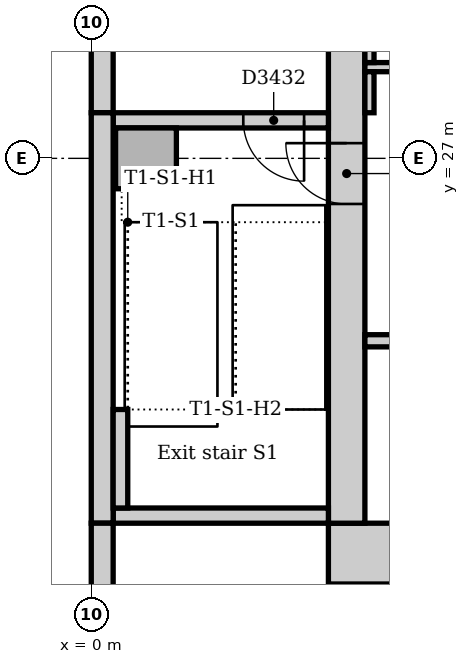
"""IFC4 building model, lengths in metres.
Left out: names, types, materials, properties, quantities, classifications, styles, units other than length and angle.
Written with IfcOpenShell. Run it as: python <this file> out.ifc"""

import sys

from ifc_helpers import new_model, si_unit, direction, frame, frame_2d, origin, origin_2d, place, context, subcontext, project, spatial, rectangle, extrude, element, fill, save


model = new_model("IFC4")
c1 = context("Model", 3, precision=1e-05, world=origin(), true_north=direction((0.0, 1.0)))
c2 = subcontext(c1, "Body", "Model", "MODEL_VIEW")
j1 = project(units=[si_unit("LENGTHUNIT", "METRE"), si_unit("PLANEANGLEUNIT", "RADIAN")], contexts=[c1])
p1 = place(None, origin())
s1 = spatial("IfcSite", under=j1, at=p1, CompositionType="ELEMENT")
p2 = place(p1, origin())
s2 = spatial("IfcBuilding", under=s1, at=p2, CompositionType="ELEMENT")
p3 = place(p2, frame((0.0, 0.0, 51.0)))
s3 = spatial("IfcBuildingStorey", under=s2, at=p3, CompositionType="ELEMENT", Elevation=51.0)
p4 = place(p3, frame((3.9, 20.5, 0.0), z_axis=(0.0, 0.0, 1.0), x_axis=(1.0, 0.0, 0.0)))
e1 = element("IfcWall", 1, at=p4, inside=s3, PredefinedType="SOLIDWALL", context=c2, shape_type="SweptSolid", body=[
    extrude(rectangle(XDim=19.6, YDim=1.0, at=frame_2d((9.8, 0.0))), origin(), (0.0, 0.0, 1.0), 4.0),
])
p5 = place(p3, frame((4.2, 31.5, 0.0), z_axis=(0.0, 0.0, 1.0), x_axis=(0.0, -1.0, 0.0)))
e2 = element("IfcWall", 2, at=p5, inside=s3, PredefinedType="SOLIDWALL", context=c2, shape_type="SweptSolid", body=[
    extrude(rectangle(XDim=10.5, YDim=0.6, at=frame_2d((5.25, 0.0))), origin(), (0.0, 0.0, 1.0), 4.0),
])
p6 = place(p5, frame((4.25, 0.0, 0.0)))
e3 = element("IfcOpeningElement", 3, at=p6, cuts=e2, PredefinedType="OPENING", context=c2, shape_type="SweptSolid", body=[
    extrude(rectangle(XDim=1.0, YDim=2.1, at=frame_2d((0.5, 1.05))), frame((0.0, 0.31, 0.0), z_axis=(0.0, -1.0, 0.0), x_axis=(1.0, 0.0, 0.0)), (0.0, 0.0, 1.0), 0.62),
])
p7 = place(p3, frame((0.36, 21.125, 0.0), z_axis=(0.0, 0.0, 1.0), x_axis=(1.0, 0.0, 0.0)))
e4 = element("IfcWall", 4, at=p7, inside=s3, PredefinedType="SOLIDWALL", context=c2, shape_type="SweptSolid", body=[
    extrude(rectangle(XDim=3.54, YDim=0.25, at=frame_2d((1.77, 0.0))), origin(), (0.0, 0.0, 1.0), 4.0),
])
p8 = place(p3, frame((3.9, 27.625, 0.0), z_axis=(0.0, 0.0, 1.0), x_axis=(-1.0, 0.0, 0.0)))
e5 = element("IfcWall", 5, at=p8, inside=s3, PredefinedType="SOLIDWALL", context=c2, shape_type="SweptSolid", body=[
    extrude(rectangle(XDim=3.54, YDim=0.25, at=frame_2d((1.77, 0.0))), origin(), (0.0, 0.0, 1.0), 4.0),
])
p9 = place(p8, frame((0.4, 0.0, 0.0)))
e6 = element("IfcOpeningElement", 6, at=p9, cuts=e5, PredefinedType="OPENING", context=c2, shape_type="SweptSolid", body=[
    extrude(rectangle(XDim=1.0, YDim=2.1, at=frame_2d((0.5, 1.05))), frame((0.0, 0.135, 0.0), z_axis=(0.0, -1.0, 0.0), x_axis=(1.0, 0.0, 0.0)), (0.0, 0.0, 1.0), 0.27),
])
p10 = place(p3, frame((0.9, 27.0, 0.0), z_axis=(0.0, 0.0, 1.0), x_axis=(1.0, 0.0, 0.0)))
e7 = element("IfcColumn", 7, at=p10, inside=s3, PredefinedType="COLUMN", context=c2, shape_type="SweptSolid", body=[
    extrude(rectangle(XDim=1.0, YDim=1.0, at=origin_2d()), origin(), (0.0, 0.0, 1.0), 4.0),
])
p11 = place(p3, frame((0.18, 35.25, 0.0), z_axis=(0.0, 0.0, 1.0), x_axis=(0.0, -1.0, 0.0)))
e8 = element("IfcWall", 8, at=p11, inside=s3, PredefinedType="STANDARD", context=c2, shape_type="SweptSolid", body=[
    extrude(rectangle(XDim=7.5, YDim=0.36, at=frame_2d((3.75, 0.0))), origin(), (0.0, 0.0, 1.0), 3.85),
])
p12 = place(p3, frame((0.18, 27.75, 0.0), z_axis=(0.0, 0.0, 1.0), x_axis=(0.0, -1.0, 0.0)))
e9 = element("IfcWall", 9, at=p12, inside=s3, PredefinedType="STANDARD", context=c2, shape_type="SweptSolid", body=[
    extrude(rectangle(XDim=6.75, YDim=0.36, at=frame_2d((3.375, 0.0))), origin(), (0.0, 0.0, 1.0), 3.85),
])
p13 = place(p3, frame((0.18, 21.0, 0.0), z_axis=(0.0, 0.0, 1.0), x_axis=(0.0, -1.0, 0.0)))
e10 = element("IfcWall", 10, at=p13, inside=s3, PredefinedType="STANDARD", context=c2, shape_type="SweptSolid", body=[
    extrude(rectangle(XDim=16.757, YDim=0.36, at=frame_2d((8.379, 0.0))), origin(), (0.0, 0.0, 1.0), 3.85),
])
p14 = place(p13, frame((1.35, 0.0, 0.9)))
e11 = element("IfcOpeningElement", 11, at=p14, cuts=e10, PredefinedType="OPENING", context=c2, shape_type="SweptSolid", body=[
    extrude(rectangle(XDim=3.3, YDim=1.6, at=frame_2d((1.65, 0.8))), frame((0.0, 0.19, 0.0), z_axis=(0.0, -1.0, 0.0), x_axis=(1.0, 0.0, 0.0)), (0.0, 0.0, 1.0), 0.38),
])
p15 = place(p13, frame((5.85, 0.0, 0.9)))
e12 = element("IfcOpeningElement", 12, at=p15, cuts=e10, PredefinedType="OPENING", context=c2, shape_type="SweptSolid", body=[
    extrude(rectangle(XDim=3.3, YDim=1.6, at=frame_2d((1.65, 0.8))), frame((0.0, 0.19, 0.0), z_axis=(0.0, -1.0, 0.0), x_axis=(1.0, 0.0, 0.0)), (0.0, 0.0, 1.0), 0.38),
])
p16 = place(p13, frame((10.35, 0.0, 0.9)))
e13 = element("IfcOpeningElement", 13, at=p16, cuts=e10, PredefinedType="OPENING", context=c2, shape_type="SweptSolid", body=[
    extrude(rectangle(XDim=3.3, YDim=1.6, at=frame_2d((1.65, 0.8))), frame((0.0, 0.19, 0.0), z_axis=(0.0, -1.0, 0.0), x_axis=(1.0, 0.0, 0.0)), (0.0, 0.0, 1.0), 0.38),
])
p17 = place(p3, frame((0.48, 21.25, 0.0), z_axis=(0.0, 0.0, 1.0), x_axis=(0.0, 1.0, 0.0)))
e14 = element("IfcWall", 14, at=p17, inside=s3, PredefinedType="STANDARD", context=c2, shape_type="SweptSolid", body=[
    extrude(rectangle(XDim=1.62, YDim=0.24, at=frame_2d((0.81, 0.0))), origin(), (0.0, 0.0, 1.0), 4.0),
])
p18 = place(p3, frame((4.5, 24.0, 0.0), z_axis=(0.0, 0.0, 1.0), x_axis=(1.0, 0.0, 0.0)))
e15 = element("IfcWall", 15, at=p18, inside=s3, PredefinedType="PARTITIONING", context=c2, shape_type="SweptSolid", body=[
    extrude(rectangle(XDim=18.0, YDim=0.2, at=frame_2d((9.0, 0.0))), origin(), (0.0, 0.0, 1.0), 3.85),
])
p19 = place(p18, frame((0.95, 0.0, 0.0)))
e16 = element("IfcOpeningElement", 16, at=p19, cuts=e15, PredefinedType="OPENING", context=c2, shape_type="SweptSolid", body=[
    extrude(rectangle(XDim=1.1, YDim=2.1, at=frame_2d((0.55, 1.05))), frame((0.0, 0.11, 0.0), z_axis=(0.0, -1.0, 0.0), x_axis=(1.0, 0.0, 0.0)), (0.0, 0.0, 1.0), 0.22),
])
p20 = place(p18, frame((3.95, 0.0, 0.0)))
e17 = element("IfcOpeningElement", 17, at=p20, cuts=e15, PredefinedType="OPENING", context=c2, shape_type="SweptSolid", body=[
    extrude(rectangle(XDim=1.1, YDim=2.1, at=frame_2d((0.55, 1.05))), frame((0.0, 0.11, 0.0), z_axis=(0.0, -1.0, 0.0), x_axis=(1.0, 0.0, 0.0)), (0.0, 0.0, 1.0), 0.22),
])
p21 = place(p18, frame((6.95, 0.0, 0.0)))
e18 = element("IfcOpeningElement", 18, at=p21, cuts=e15, PredefinedType="OPENING", context=c2, shape_type="SweptSolid", body=[
    extrude(rectangle(XDim=1.1, YDim=2.1, at=frame_2d((0.55, 1.05))), frame((0.0, 0.11, 0.0), z_axis=(0.0, -1.0, 0.0), x_axis=(1.0, 0.0, 0.0)), (0.0, 0.0, 1.0), 0.22),
])
p22 = place(p18, frame((9.95, 0.0, 0.0)))
e19 = element("IfcOpeningElement", 19, at=p22, cuts=e15, PredefinedType="OPENING", context=c2, shape_type="SweptSolid", body=[
    extrude(rectangle(XDim=1.1, YDim=2.1, at=frame_2d((0.55, 1.05))), frame((0.0, 0.11, 0.0), z_axis=(0.0, -1.0, 0.0), x_axis=(1.0, 0.0, 0.0)), (0.0, 0.0, 1.0), 0.22),
])
p23 = place(p18, frame((12.95, 0.0, 0.0)))
e20 = element("IfcOpeningElement", 20, at=p23, cuts=e15, PredefinedType="OPENING", context=c2, shape_type="SweptSolid", body=[
    extrude(rectangle(XDim=1.1, YDim=2.1, at=frame_2d((0.55, 1.05))), frame((0.0, 0.11, 0.0), z_axis=(0.0, -1.0, 0.0), x_axis=(1.0, 0.0, 0.0)), (0.0, 0.0, 1.0), 0.22),
])
p24 = place(p18, frame((15.95, 0.0, 0.0)))
e21 = element("IfcOpeningElement", 21, at=p24, cuts=e15, PredefinedType="OPENING", context=c2, shape_type="SweptSolid", body=[
    extrude(rectangle(XDim=1.1, YDim=2.1, at=frame_2d((0.55, 1.05))), frame((0.0, 0.11, 0.0), z_axis=(0.0, -1.0, 0.0), x_axis=(1.0, 0.0, 0.0)), (0.0, 0.0, 1.0), 0.22),
])
p25 = place(p3, frame((4.5, 28.5, 0.0), z_axis=(0.0, 0.0, 1.0), x_axis=(1.0, 0.0, 0.0)))
e22 = element("IfcWall", 22, at=p25, inside=s3, PredefinedType="PARTITIONING", context=c2, shape_type="SweptSolid", body=[
    extrude(rectangle(XDim=18.0, YDim=0.15, at=frame_2d((9.0, 0.0))), origin(), (0.0, 0.0, 1.0), 3.85),
])
p26 = place(p25, frame((1.85, 0.0, 0.0)))
e23 = element("IfcOpeningElement", 23, at=p26, cuts=e22, PredefinedType="OPENING", context=c2, shape_type="SweptSolid", body=[
    extrude(rectangle(XDim=0.9, YDim=2.1, at=frame_2d((0.45, 1.05))), frame((0.0, 0.085, 0.0), z_axis=(0.0, -1.0, 0.0), x_axis=(1.0, 0.0, 0.0)), (0.0, 0.0, 1.0), 0.17),
])
p27 = place(p25, frame((8.55, 0.0, 0.0)))
e24 = element("IfcOpeningElement", 24, at=p27, cuts=e22, PredefinedType="OPENING", context=c2, shape_type="SweptSolid", body=[
    extrude(rectangle(XDim=0.9, YDim=2.1, at=frame_2d((0.45, 1.05))), frame((0.0, 0.085, 0.0), z_axis=(0.0, -1.0, 0.0), x_axis=(1.0, 0.0, 0.0)), (0.0, 0.0, 1.0), 0.17),
])
p28 = place(p25, frame((15.2, 0.0, 0.0)))
e25 = element("IfcOpeningElement", 25, at=p28, cuts=e22, PredefinedType="OPENING", context=c2, shape_type="SweptSolid", body=[
    extrude(rectangle(XDim=0.9, YDim=2.1, at=frame_2d((0.45, 1.05))), frame((0.0, 0.085, 0.0), z_axis=(0.0, -1.0, 0.0), x_axis=(1.0, 0.0, 0.0)), (0.0, 0.0, 1.0), 0.17),
])
p29 = place(p3, frame((4.575, 27.75, 0.0), z_axis=(0.0, 0.0, 1.0), x_axis=(0.0, 1.0, 0.0)))
e26 = element("IfcWall", 26, at=p29, inside=s3, PredefinedType="PARTITIONING", context=c2, shape_type="SweptSolid", body=[
    extrude(rectangle(XDim=0.675, YDim=0.15, at=frame_2d((0.338, 0.0))), origin(), (0.0, 0.0, 1.0), 3.85),
])
p30 = place(p3, frame((4.575, 28.575, 0.0), z_axis=(0.0, 0.0, 1.0), x_axis=(0.0, 1.0, 0.0)))
e27 = element("IfcWall", 27, at=p30, inside=s3, PredefinedType="PARTITIONING", context=c2, shape_type="SweptSolid", body=[
    extrude(rectangle(XDim=2.675, YDim=0.15, at=frame_2d((1.337, 0.0))), origin(), (0.0, 0.0, 1.0), 3.85),
])
p31 = place(p6, frame((1.0, 0.0, 0.0), z_axis=(0.0, 0.0, 1.0), x_axis=(-1.0, 0.0, 0.0)))
e28 = element("IfcDoor", 28, at=p31, inside=s3, OperationType="SINGLE_SWING_RIGHT", PredefinedType="DOOR", context=c2, shape_type="SweptSolid", body=[
    extrude(rectangle(XDim=1.0, YDim=2.1, at=frame_2d((0.5, 1.05))), frame((0.0, 0.025, 0.0), z_axis=(0.0, -1.0, 0.0), x_axis=(1.0, 0.0, 0.0)), (0.0, 0.0, 1.0), 0.05),
])
fill(e3, e28)
p32 = place(p9, origin())
e29 = element("IfcDoor", 29, at=p32, inside=s3, OperationType="SINGLE_SWING_LEFT", PredefinedType="DOOR", context=c2, shape_type="SweptSolid", body=[
    extrude(rectangle(XDim=1.0, YDim=2.1, at=frame_2d((0.5, 1.05))), frame((0.0, 0.025, 0.0), z_axis=(0.0, -1.0, 0.0), x_axis=(1.0, 0.0, 0.0)), (0.0, 0.0, 1.0), 0.05),
])
fill(e6, e29)
save(model, sys.argv[1])
